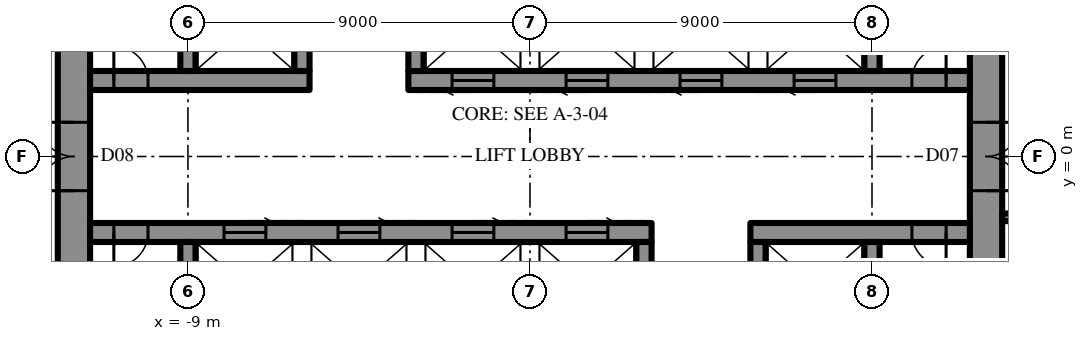
"""IFC4 building model, lengths in metres.
Left out: names, types, materials, properties, quantities, classifications, styles, units other than length and angle.
Written with IfcOpenShell. Run it as: python <this file> out.ifc"""

import sys

from ifc_helpers import new_model, si_unit, direction, frame, frame_2d, origin, place, context, subcontext, project, spatial, rectangle, extrude, element, fill, save


model = new_model("IFC4")
c1 = context("Model", 3, precision=1e-05, world=origin(), true_north=direction((0.0, 1.0)))
c2 = subcontext(c1, "Body", "Model", "MODEL_VIEW")
j1 = project(units=[si_unit("LENGTHUNIT", "METRE"), si_unit("PLANEANGLEUNIT", "RADIAN")], contexts=[c1])
p1 = place(None, origin())
s1 = spatial("IfcSite", under=j1, at=p1, CompositionType="ELEMENT")
p2 = place(p1, origin())
s2 = spatial("IfcBuilding", under=s1, at=p2, CompositionType="ELEMENT")
p3 = place(p2, frame((0.0, 0.0, 345.1)))
s3 = spatial("IfcBuildingStorey", under=s2, at=p3, CompositionType="ELEMENT", Elevation=345.1)
p4 = place(p3, frame((12.0, -10.7, 0.0), z_axis=(0.0, 0.0, 1.0), x_axis=(0.0, 1.0, 0.0)))
e1 = element("IfcWall", 1, at=p4, inside=s3, PredefinedType="SHEAR", context=c2, shape_type="SweptSolid", body=[
    extrude(rectangle(XDim=21.4, YDim=0.85, at=frame_2d((10.7, 0.0))), origin(), (0.0, 0.0, 1.0), 4.2),
])
p5 = place(p4, frame((9.8, 0.0, 0.0)))
e2 = element("IfcOpeningElement", 2, at=p5, cuts=e1, PredefinedType="OPENING", context=c2, shape_type="SweptSolid", body=[
    extrude(rectangle(XDim=1.8, YDim=2.4, at=frame_2d((0.9, 1.2))), frame((0.0, 0.435, 0.0), z_axis=(0.0, -1.0, 0.0), x_axis=(1.0, 0.0, 0.0)), (0.0, 0.0, 1.0), 0.87),
])
p6 = place(p3, frame((-12.0, 10.7, 0.0), z_axis=(0.0, 0.0, 1.0), x_axis=(0.0, -1.0, 0.0)))
e3 = element("IfcWall", 3, at=p6, inside=s3, PredefinedType="SHEAR", context=c2, shape_type="SweptSolid", body=[
    extrude(rectangle(XDim=21.4, YDim=0.85, at=frame_2d((10.7, 0.0))), origin(), (0.0, 0.0, 1.0), 4.2),
])
p7 = place(p6, frame((9.8, 0.0, 0.0)))
e4 = element("IfcOpeningElement", 4, at=p7, cuts=e3, PredefinedType="OPENING", context=c2, shape_type="SweptSolid", body=[
    extrude(rectangle(XDim=1.8, YDim=2.4, at=frame_2d((0.9, 1.2))), frame((0.0, 0.435, 0.0), z_axis=(0.0, -1.0, 0.0), x_axis=(1.0, 0.0, 0.0)), (0.0, 0.0, 1.0), 0.87),
])
p8 = place(p3, frame((-11.575, 2.0, 0.0), z_axis=(0.0, 0.0, 1.0), x_axis=(1.0, 0.0, 0.0)))
e5 = element("IfcWall", 5, at=p8, inside=s3, PredefinedType="SHEAR", context=c2, shape_type="SweptSolid", body=[
    extrude(rectangle(XDim=5.775, YDim=0.5, at=frame_2d((2.887, 0.0))), origin(), (0.0, 0.0, 1.0), 4.2),
])
p9 = place(p8, frame((0.625, 0.0, 0.0)))
e6 = element("IfcOpeningElement", 6, at=p9, cuts=e5, PredefinedType="OPENING", context=c2, shape_type="SweptSolid", body=[
    extrude(rectangle(XDim=0.9, YDim=2.2, at=frame_2d((0.45, 1.1))), frame((0.0, 0.26, 0.0), z_axis=(0.0, -1.0, 0.0), x_axis=(1.0, 0.0, 0.0)), (0.0, 0.0, 1.0), 0.52),
])
p10 = place(p3, frame((-3.2, 2.0, 0.0), z_axis=(0.0, 0.0, 1.0), x_axis=(1.0, 0.0, 0.0)))
e7 = element("IfcWall", 7, at=p10, inside=s3, PredefinedType="SHEAR", context=c2, shape_type="SweptSolid", body=[
    extrude(rectangle(XDim=14.775, YDim=0.5, at=frame_2d((7.387, 0.0))), origin(), (0.0, 0.0, 1.0), 4.2),
])
p11 = place(p10, frame((13.25, 0.0, 0.0)))
e8 = element("IfcOpeningElement", 8, at=p11, cuts=e7, PredefinedType="OPENING", context=c2, shape_type="SweptSolid", body=[
    extrude(rectangle(XDim=0.9, YDim=2.2, at=frame_2d((0.45, 1.1))), frame((0.0, 0.26, 0.0), z_axis=(0.0, -1.0, 0.0), x_axis=(1.0, 0.0, 0.0)), (0.0, 0.0, 1.0), 0.52),
])
p12 = place(p10, frame((1.15, 0.0, 0.0)))
e9 = element("IfcOpeningElement", 9, at=p12, cuts=e7, PredefinedType="OPENING", context=c2, shape_type="SweptSolid", body=[
    extrude(rectangle(XDim=1.1, YDim=2.2, at=frame_2d((0.55, 1.1))), frame((0.0, 0.26, 0.0), z_axis=(0.0, -1.0, 0.0), x_axis=(1.0, 0.0, 0.0)), (0.0, 0.0, 1.0), 0.52),
])
p13 = place(p10, frame((4.15, 0.0, 0.0)))
e10 = element("IfcOpeningElement", 10, at=p13, cuts=e7, PredefinedType="OPENING", context=c2, shape_type="SweptSolid", body=[
    extrude(rectangle(XDim=1.1, YDim=2.2, at=frame_2d((0.55, 1.1))), frame((0.0, 0.26, 0.0), z_axis=(0.0, -1.0, 0.0), x_axis=(1.0, 0.0, 0.0)), (0.0, 0.0, 1.0), 0.52),
])
p14 = place(p10, frame((7.15, 0.0, 0.0)))
e11 = element("IfcOpeningElement", 11, at=p14, cuts=e7, PredefinedType="OPENING", context=c2, shape_type="SweptSolid", body=[
    extrude(rectangle(XDim=1.1, YDim=2.2, at=frame_2d((0.55, 1.1))), frame((0.0, 0.26, 0.0), z_axis=(0.0, -1.0, 0.0), x_axis=(1.0, 0.0, 0.0)), (0.0, 0.0, 1.0), 0.52),
])
p15 = place(p10, frame((10.15, 0.0, 0.0)))
e12 = element("IfcOpeningElement", 12, at=p15, cuts=e7, PredefinedType="OPENING", context=c2, shape_type="SweptSolid", body=[
    extrude(rectangle(XDim=1.1, YDim=2.2, at=frame_2d((0.55, 1.1))), frame((0.0, 0.26, 0.0), z_axis=(0.0, -1.0, 0.0), x_axis=(1.0, 0.0, 0.0)), (0.0, 0.0, 1.0), 0.52),
])
for number, where, z_axis, x_axis in (
    (13, (-9.0, 2.25, 0.0), (0.0, 0.0, 1.0), (0.0, 1.0, 0.0)),
    (14, (-6.0, 2.25, 0.0), (0.0, 0.0, 1.0), (0.0, 1.0, 0.0)),
    (15, (-3.0, 2.25, 0.0), (0.0, 0.0, 1.0), (0.0, 1.0, 0.0)),
    (16, (9.0, 2.25, 0.0), (0.0, 0.0, 1.0), (0.0, 1.0, 0.0)),
):
    element("IfcWall", number, at=place(p3, frame(where, z_axis=z_axis, x_axis=x_axis)), inside=s3, PredefinedType="SHEAR", context=c2, shape_type="SweptSolid", body=[
        extrude(rectangle(XDim=2.3, YDim=0.4, at=frame_2d((1.15, 0.0))), origin(), (0.0, 0.0, 1.0), 4.2),
    ])
p16 = place(p3, frame((11.575, -2.0, 0.0), z_axis=(0.0, 0.0, 1.0), x_axis=(-1.0, 0.0, 0.0)))
e17 = element("IfcWall", 17, at=p16, inside=s3, PredefinedType="SHEAR", context=c2, shape_type="SweptSolid", body=[
    extrude(rectangle(XDim=5.775, YDim=0.5, at=frame_2d((2.887, 0.0))), origin(), (0.0, 0.0, 1.0), 4.2),
])
p17 = place(p16, frame((0.625, 0.0, 0.0)))
e18 = element("IfcOpeningElement", 18, at=p17, cuts=e17, PredefinedType="OPENING", context=c2, shape_type="SweptSolid", body=[
    extrude(rectangle(XDim=0.9, YDim=2.2, at=frame_2d((0.45, 1.1))), frame((0.0, 0.26, 0.0), z_axis=(0.0, -1.0, 0.0), x_axis=(1.0, 0.0, 0.0)), (0.0, 0.0, 1.0), 0.52),
])
p18 = place(p3, frame((3.2, -2.0, 0.0), z_axis=(0.0, 0.0, 1.0), x_axis=(-1.0, 0.0, 0.0)))
e19 = element("IfcWall", 19, at=p18, inside=s3, PredefinedType="SHEAR", context=c2, shape_type="SweptSolid", body=[
    extrude(rectangle(XDim=14.775, YDim=0.5, at=frame_2d((7.387, 0.0))), origin(), (0.0, 0.0, 1.0), 4.2),
])
p19 = place(p18, frame((13.25, 0.0, 0.0)))
e20 = element("IfcOpeningElement", 20, at=p19, cuts=e19, PredefinedType="OPENING", context=c2, shape_type="SweptSolid", body=[
    extrude(rectangle(XDim=0.9, YDim=2.2, at=frame_2d((0.45, 1.1))), frame((0.0, 0.26, 0.0), z_axis=(0.0, -1.0, 0.0), x_axis=(1.0, 0.0, 0.0)), (0.0, 0.0, 1.0), 0.52),
])
p20 = place(p18, frame((1.15, 0.0, 0.0)))
e21 = element("IfcOpeningElement", 21, at=p20, cuts=e19, PredefinedType="OPENING", context=c2, shape_type="SweptSolid", body=[
    extrude(rectangle(XDim=1.1, YDim=2.2, at=frame_2d((0.55, 1.1))), frame((0.0, 0.26, 0.0), z_axis=(0.0, -1.0, 0.0), x_axis=(1.0, 0.0, 0.0)), (0.0, 0.0, 1.0), 0.52),
])
p21 = place(p18, frame((4.15, 0.0, 0.0)))
e22 = element("IfcOpeningElement", 22, at=p21, cuts=e19, PredefinedType="OPENING", context=c2, shape_type="SweptSolid", body=[
    extrude(rectangle(XDim=1.1, YDim=2.2, at=frame_2d((0.55, 1.1))), frame((0.0, 0.26, 0.0), z_axis=(0.0, -1.0, 0.0), x_axis=(1.0, 0.0, 0.0)), (0.0, 0.0, 1.0), 0.52),
])
p22 = place(p18, frame((7.15, 0.0, 0.0)))
e23 = element("IfcOpeningElement", 23, at=p22, cuts=e19, PredefinedType="OPENING", context=c2, shape_type="SweptSolid", body=[
    extrude(rectangle(XDim=1.1, YDim=2.2, at=frame_2d((0.55, 1.1))), frame((0.0, 0.26, 0.0), z_axis=(0.0, -1.0, 0.0), x_axis=(1.0, 0.0, 0.0)), (0.0, 0.0, 1.0), 0.52),
])
p23 = place(p18, frame((10.15, 0.0, 0.0)))
e24 = element("IfcOpeningElement", 24, at=p23, cuts=e19, PredefinedType="OPENING", context=c2, shape_type="SweptSolid", body=[
    extrude(rectangle(XDim=1.1, YDim=2.2, at=frame_2d((0.55, 1.1))), frame((0.0, 0.26, 0.0), z_axis=(0.0, -1.0, 0.0), x_axis=(1.0, 0.0, 0.0)), (0.0, 0.0, 1.0), 0.52),
])
for number, where, z_axis, x_axis in (
    (25, (9.0, -2.25, 0.0), (0.0, 0.0, 1.0), (0.0, -1.0, 0.0)),
    (26, (6.0, -2.25, 0.0), (0.0, 0.0, 1.0), (0.0, -1.0, 0.0)),
    (27, (3.0, -2.25, 0.0), (0.0, 0.0, 1.0), (0.0, -1.0, 0.0)),
    (28, (-9.0, -2.25, 0.0), (0.0, 0.0, 1.0), (0.0, -1.0, 0.0)),
):
    element("IfcWall", number, at=place(p3, frame(where, z_axis=z_axis, x_axis=x_axis)), inside=s3, PredefinedType="SHEAR", context=c2, shape_type="SweptSolid", body=[
        extrude(rectangle(XDim=2.3, YDim=0.4, at=frame_2d((1.15, 0.0))), origin(), (0.0, 0.0, 1.0), 4.2),
    ])
p24 = place(p3, frame((12.425, -1.6, 0.0), z_axis=(0.0, 0.0, 1.0), x_axis=(1.0, 0.0, 0.0)))
e29 = element("IfcWall", 29, at=p24, inside=s3, PredefinedType="PARTITIONING", context=c2, shape_type="SweptSolid", body=[
    extrude(rectangle(XDim=16.5, YDim=0.2, at=frame_2d((8.25, 0.0))), origin(), (0.0, 0.0, 1.0), 4.0),
])
p25 = place(p24, frame((1.15, 0.0, 0.0)))
e30 = element("IfcOpeningElement", 30, at=p25, cuts=e29, PredefinedType="OPENING", context=c2, shape_type="SweptSolid", body=[
    extrude(rectangle(XDim=1.0, YDim=2.2, at=frame_2d((0.5, 1.1))), frame((0.0, 0.11, 0.0), z_axis=(0.0, -1.0, 0.0), x_axis=(1.0, 0.0, 0.0)), (0.0, 0.0, 1.0), 0.22),
])
p26 = place(p5, frame((1.8, 0.0, 0.0), z_axis=(0.0, 0.0, 1.0), x_axis=(-1.0, 0.0, 0.0)))
e31 = element("IfcDoor", 31, at=p26, inside=s3, OperationType="DOUBLE_DOOR_SINGLE_SWING", PredefinedType="DOOR", context=c2, shape_type="SweptSolid", body=[
    extrude(rectangle(XDim=1.8, YDim=2.4, at=frame_2d((0.9, 1.2))), frame((0.0, 0.025, 0.0), z_axis=(0.0, -1.0, 0.0), x_axis=(1.0, 0.0, 0.0)), (0.0, 0.0, 1.0), 0.05),
])
fill(e2, e31)
p27 = place(p7, frame((1.8, 0.0, 0.0), z_axis=(0.0, 0.0, 1.0), x_axis=(-1.0, 0.0, 0.0)))
e32 = element("IfcDoor", 32, at=p27, inside=s3, OperationType="DOUBLE_DOOR_SINGLE_SWING", PredefinedType="DOOR", context=c2, shape_type="SweptSolid", body=[
    extrude(rectangle(XDim=1.8, YDim=2.4, at=frame_2d((0.9, 1.2))), frame((0.0, 0.025, 0.0), z_axis=(0.0, -1.0, 0.0), x_axis=(1.0, 0.0, 0.0)), (0.0, 0.0, 1.0), 0.05),
])
fill(e4, e32)
p28 = place(p9, origin())
e33 = element("IfcDoor", 33, at=p28, inside=s3, OperationType="SINGLE_SWING_RIGHT", PredefinedType="DOOR", context=c2, shape_type="SweptSolid", body=[
    extrude(rectangle(XDim=0.9, YDim=2.2, at=frame_2d((0.45, 1.1))), frame((0.0, 0.025, 0.0), z_axis=(0.0, -1.0, 0.0), x_axis=(1.0, 0.0, 0.0)), (0.0, 0.0, 1.0), 0.05),
])
fill(e6, e33)
p29 = place(p11, origin())
e34 = element("IfcDoor", 34, at=p29, inside=s3, OperationType="SINGLE_SWING_LEFT", PredefinedType="DOOR", context=c2, shape_type="SweptSolid", body=[
    extrude(rectangle(XDim=0.9, YDim=2.2, at=frame_2d((0.45, 1.1))), frame((0.0, 0.025, 0.0), z_axis=(0.0, -1.0, 0.0), x_axis=(1.0, 0.0, 0.0)), (0.0, 0.0, 1.0), 0.05),
])
fill(e8, e34)
p30 = place(p17, origin())
e35 = element("IfcDoor", 35, at=p30, inside=s3, OperationType="SINGLE_SWING_RIGHT", PredefinedType="DOOR", context=c2, shape_type="SweptSolid", body=[
    extrude(rectangle(XDim=0.9, YDim=2.2, at=frame_2d((0.45, 1.1))), frame((0.0, 0.025, 0.0), z_axis=(0.0, -1.0, 0.0), x_axis=(1.0, 0.0, 0.0)), (0.0, 0.0, 1.0), 0.05),
])
fill(e18, e35)
p31 = place(p19, origin())
e36 = element("IfcDoor", 36, at=p31, inside=s3, OperationType="SINGLE_SWING_LEFT", PredefinedType="DOOR", context=c2, shape_type="SweptSolid", body=[
    extrude(rectangle(XDim=0.9, YDim=2.2, at=frame_2d((0.45, 1.1))), frame((0.0, 0.025, 0.0), z_axis=(0.0, -1.0, 0.0), x_axis=(1.0, 0.0, 0.0)), (0.0, 0.0, 1.0), 0.05),
])
fill(e20, e36)
p32 = place(p12, frame((1.1, 0.0, 0.0), z_axis=(0.0, 0.0, 1.0), x_axis=(-1.0, 0.0, 0.0)))
e37 = element("IfcDoor", 37, at=p32, inside=s3, OperationType="SLIDING_TO_LEFT", PredefinedType="DOOR", context=c2, shape_type="SweptSolid", body=[
    extrude(rectangle(XDim=1.1, YDim=2.2, at=frame_2d((0.55, 1.1))), frame((0.0, 0.025, 0.0), z_axis=(0.0, -1.0, 0.0), x_axis=(1.0, 0.0, 0.0)), (0.0, 0.0, 1.0), 0.05),
])
fill(e9, e37)
p33 = place(p13, frame((1.1, 0.0, 0.0), z_axis=(0.0, 0.0, 1.0), x_axis=(-1.0, 0.0, 0.0)))
e38 = element("IfcDoor", 38, at=p33, inside=s3, OperationType="SLIDING_TO_LEFT", PredefinedType="DOOR", context=c2, shape_type="SweptSolid", body=[
    extrude(rectangle(XDim=1.1, YDim=2.2, at=frame_2d((0.55, 1.1))), frame((0.0, 0.025, 0.0), z_axis=(0.0, -1.0, 0.0), x_axis=(1.0, 0.0, 0.0)), (0.0, 0.0, 1.0), 0.05),
])
fill(e10, e38)
p34 = place(p14, frame((1.1, 0.0, 0.0), z_axis=(0.0, 0.0, 1.0), x_axis=(-1.0, 0.0, 0.0)))
e39 = element("IfcDoor", 39, at=p34, inside=s3, OperationType="SLIDING_TO_LEFT", PredefinedType="DOOR", context=c2, shape_type="SweptSolid", body=[
    extrude(rectangle(XDim=1.1, YDim=2.2, at=frame_2d((0.55, 1.1))), frame((0.0, 0.025, 0.0), z_axis=(0.0, -1.0, 0.0), x_axis=(1.0, 0.0, 0.0)), (0.0, 0.0, 1.0), 0.05),
])
fill(e11, e39)
p35 = place(p15, frame((1.1, 0.0, 0.0), z_axis=(0.0, 0.0, 1.0), x_axis=(-1.0, 0.0, 0.0)))
e40 = element("IfcDoor", 40, at=p35, inside=s3, OperationType="SLIDING_TO_LEFT", PredefinedType="DOOR", context=c2, shape_type="SweptSolid", body=[
    extrude(rectangle(XDim=1.1, YDim=2.2, at=frame_2d((0.55, 1.1))), frame((0.0, 0.025, 0.0), z_axis=(0.0, -1.0, 0.0), x_axis=(1.0, 0.0, 0.0)), (0.0, 0.0, 1.0), 0.05),
])
fill(e12, e40)
p36 = place(p20, frame((1.1, 0.0, 0.0), z_axis=(0.0, 0.0, 1.0), x_axis=(-1.0, 0.0, 0.0)))
e41 = element("IfcDoor", 41, at=p36, inside=s3, OperationType="SLIDING_TO_LEFT", PredefinedType="DOOR", context=c2, shape_type="SweptSolid", body=[
    extrude(rectangle(XDim=1.1, YDim=2.2, at=frame_2d((0.55, 1.1))), frame((0.0, 0.025, 0.0), z_axis=(0.0, -1.0, 0.0), x_axis=(1.0, 0.0, 0.0)), (0.0, 0.0, 1.0), 0.05),
])
fill(e21, e41)
p37 = place(p21, frame((1.1, 0.0, 0.0), z_axis=(0.0, 0.0, 1.0), x_axis=(-1.0, 0.0, 0.0)))
e42 = element("IfcDoor", 42, at=p37, inside=s3, OperationType="SLIDING_TO_LEFT", PredefinedType="DOOR", context=c2, shape_type="SweptSolid", body=[
    extrude(rectangle(XDim=1.1, YDim=2.2, at=frame_2d((0.55, 1.1))), frame((0.0, 0.025, 0.0), z_axis=(0.0, -1.0, 0.0), x_axis=(1.0, 0.0, 0.0)), (0.0, 0.0, 1.0), 0.05),
])
fill(e22, e42)
p38 = place(p22, frame((1.1, 0.0, 0.0), z_axis=(0.0, 0.0, 1.0), x_axis=(-1.0, 0.0, 0.0)))
e43 = element("IfcDoor", 43, at=p38, inside=s3, OperationType="SLIDING_TO_LEFT", PredefinedType="DOOR", context=c2, shape_type="SweptSolid", body=[
    extrude(rectangle(XDim=1.1, YDim=2.2, at=frame_2d((0.55, 1.1))), frame((0.0, 0.025, 0.0), z_axis=(0.0, -1.0, 0.0), x_axis=(1.0, 0.0, 0.0)), (0.0, 0.0, 1.0), 0.05),
])
fill(e23, e43)
p39 = place(p23, frame((1.1, 0.0, 0.0), z_axis=(0.0, 0.0, 1.0), x_axis=(-1.0, 0.0, 0.0)))
e44 = element("IfcDoor", 44, at=p39, inside=s3, OperationType="SLIDING_TO_LEFT", PredefinedType="DOOR", context=c2, shape_type="SweptSolid", body=[
    extrude(rectangle(XDim=1.1, YDim=2.2, at=frame_2d((0.55, 1.1))), frame((0.0, 0.025, 0.0), z_axis=(0.0, -1.0, 0.0), x_axis=(1.0, 0.0, 0.0)), (0.0, 0.0, 1.0), 0.05),
])
fill(e24, e44)
save(model, sys.argv[1])
